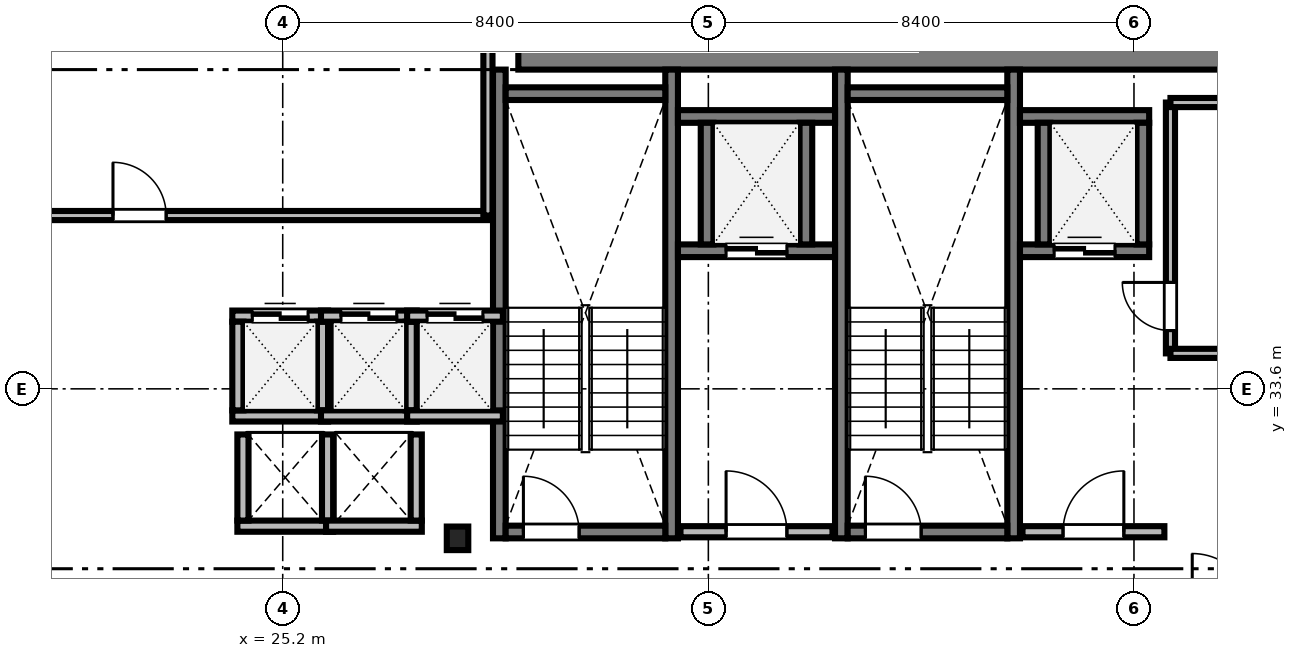
"""IFC4 building model, lengths in metres.
Left out: names, types, materials, properties, quantities, classifications, styles, units other than length and angle.
Written with IfcOpenShell. Run it as: python <this file> out.ifc"""

import sys

from ifc_helpers import new_model, si_unit, direction, frame, frame_2d, origin, origin_2d, place, context, subcontext, project, spatial, rectangle, i_section, extrude, source, transform, mapped, element, fill, save


model = new_model("IFC4")
c1 = context("Model", 3, precision=1e-05, world=origin(), true_north=direction((0.0, 1.0)))
c2 = subcontext(c1, "Body", "Model", "MODEL_VIEW")
j1 = project(units=[si_unit("LENGTHUNIT", "METRE"), si_unit("PLANEANGLEUNIT", "RADIAN")], contexts=[c1])
p1 = place(None, origin())
s1 = spatial("IfcSite", under=j1, at=p1, CompositionType="ELEMENT")
p2 = place(p1, origin())
s2 = spatial("IfcBuilding", under=s1, at=p2, CompositionType="ELEMENT")
p3 = place(p2, frame((0.0, 0.0, 111.3)))
s3 = spatial("IfcBuildingStorey", under=s2, at=p3, CompositionType="ELEMENT", Elevation=111.3)
m1 = source(origin(), c2, "Body", "SweptSolid", [
    extrude(rectangle(XDim=17.52, YDim=0.8, at=frame_2d((8.76, 0.0))), origin(), (0.0, 0.0, 1.0), 3.46),
])
p4 = place(p3, frame((29.85, 40.3, 0.0), z_axis=(0.0, 0.0, 1.0), x_axis=(1.0, 0.0, 0.0)))
e1 = element("IfcWall", 1, at=p4, inside=s3, PredefinedType="SHEAR", context=c2, shape_type="MappedRepresentation", body=[
    mapped(m1, transform((0.0, 0.0, 0.0), scale=1.0)),
])
m2 = source(origin(), c2, "Body", "SweptSolid", [
    extrude(i_section(OverallWidth=0.424, OverallDepth=0.465, WebThickness=0.035, FlangeThickness=0.056, FilletRadius=0.015, at=origin_2d()), origin(), (0.0, 0.0, 1.0), 3.46),
])
p5 = place(p3, frame((28.65, 30.65, 0.0), z_axis=(0.0, 0.0, 1.0), x_axis=(1.0, 0.0, 0.0)))
e2 = element("IfcColumn", 2, at=p5, inside=s3, PredefinedType="COLUMN", context=c2, shape_type="MappedRepresentation", body=[
    mapped(m2, transform((0.0, 0.0, 0.0), scale=1.0)),
])
m3 = source(origin(), c2, "Body", "SweptSolid", [
    extrude(rectangle(XDim=9.25, YDim=0.25, at=frame_2d((4.625, 0.0))), origin(), (0.0, 0.0, 1.0), 3.5),
])
for number, where, z_axis, x_axis in (
    (3, (29.475, 30.65, 0.0), (0.0, 0.0, 1.0), (0.0, 1.0, 0.0)),
    (4, (32.875, 30.65, 0.0), (0.0, 0.0, 1.0), (0.0, 1.0, 0.0)),
):
    element("IfcWall", number, at=place(p3, frame(where, z_axis=z_axis, x_axis=x_axis)), inside=s3, PredefinedType="SOLIDWALL", context=c2, shape_type="MappedRepresentation", body=[
        mapped(m3, transform((0.0, 0.0, 0.0), scale=1.0)),
    ])
m4 = source(origin(), c2, "Body", "SweptSolid", [
    extrude(rectangle(XDim=3.15, YDim=0.25, at=frame_2d((1.575, 0.0))), origin(), (0.0, 0.0, 1.0), 3.5),
])
p6 = place(p3, frame((29.6, 39.425, 0.0), z_axis=(0.0, 0.0, 1.0), x_axis=(1.0, 0.0, 0.0)))
e5 = element("IfcWall", 5, at=p6, inside=s3, PredefinedType="SOLIDWALL", context=c2, shape_type="MappedRepresentation", body=[
    mapped(m4, transform((0.0, 0.0, 0.0), scale=1.0)),
])
p7 = place(p3, frame((29.6, 30.775, 0.0), z_axis=(0.0, 0.0, 1.0), x_axis=(1.0, 0.0, 0.0)))
e6 = element("IfcWall", 6, at=p7, inside=s3, PredefinedType="SOLIDWALL", context=c2, shape_type="MappedRepresentation", body=[
    mapped(m4, transform((0.0, 0.0, 0.0), scale=1.0)),
])
m5 = source(origin(), c2, "Body", "SweptSolid", [
    extrude(rectangle(XDim=1.1, YDim=2.2, at=frame_2d((0.55, 1.1))), frame((0.0, 0.135, 0.0), z_axis=(0.0, -1.0, 0.0), x_axis=(1.0, 0.0, 0.0)), (0.0, 0.0, 1.0), 0.27),
])
p8 = place(p7, frame((0.35, 0.0, 0.0)))
e7 = element("IfcOpeningElement", 7, at=p8, cuts=e6, PredefinedType="OPENING", context=c2, shape_type="MappedRepresentation", body=[
    mapped(m5, transform((0.0, 0.0, 0.0), scale=1.0)),
])
for number, where, z_axis, x_axis in (
    (8, (36.225, 30.65, 0.0), (0.0, 0.0, 1.0), (0.0, 1.0, 0.0)),
    (9, (39.625, 30.65, 0.0), (0.0, 0.0, 1.0), (0.0, 1.0, 0.0)),
):
    element("IfcWall", number, at=place(p3, frame(where, z_axis=z_axis, x_axis=x_axis)), inside=s3, PredefinedType="SOLIDWALL", context=c2, shape_type="MappedRepresentation", body=[
        mapped(m3, transform((0.0, 0.0, 0.0), scale=1.0)),
    ])
p9 = place(p3, frame((36.35, 39.425, 0.0), z_axis=(0.0, 0.0, 1.0), x_axis=(1.0, 0.0, 0.0)))
e10 = element("IfcWall", 10, at=p9, inside=s3, PredefinedType="SOLIDWALL", context=c2, shape_type="MappedRepresentation", body=[
    mapped(m4, transform((0.0, 0.0, 0.0), scale=1.0)),
])
p10 = place(p3, frame((36.35, 30.775, 0.0), z_axis=(0.0, 0.0, 1.0), x_axis=(1.0, 0.0, 0.0)))
e11 = element("IfcWall", 11, at=p10, inside=s3, PredefinedType="SOLIDWALL", context=c2, shape_type="MappedRepresentation", body=[
    mapped(m4, transform((0.0, 0.0, 0.0), scale=1.0)),
])
p11 = place(p10, frame((0.35, 0.0, 0.0)))
e12 = element("IfcOpeningElement", 12, at=p11, cuts=e11, PredefinedType="OPENING", context=c2, shape_type="MappedRepresentation", body=[
    mapped(m5, transform((0.0, 0.0, 0.0), scale=1.0)),
])
m6 = source(origin(), c2, "Body", "SweptSolid", [
    extrude(rectangle(XDim=3.0, YDim=0.22, at=frame_2d((1.5, 0.0))), origin(), (0.0, 0.0, 1.0), 3.46),
])
p12 = place(p3, frame((33.05, 30.78, 0.0), z_axis=(0.0, 0.0, 1.0), x_axis=(1.0, 0.0, 0.0)))
e13 = element("IfcWall", 13, at=p12, inside=s3, PredefinedType="SOLIDWALL", context=c2, shape_type="MappedRepresentation", body=[
    mapped(m6, transform((0.0, 0.0, 0.0), scale=1.0)),
])
m7 = source(origin(), c2, "Body", "SweptSolid", [
    extrude(rectangle(XDim=1.2, YDim=2.2, at=frame_2d((0.6, 1.1))), frame((0.0, 0.12, 0.0), z_axis=(0.0, -1.0, 0.0), x_axis=(1.0, 0.0, 0.0)), (0.0, 0.0, 1.0), 0.24),
])
p13 = place(p12, frame((0.9, 0.0, 0.0)))
e14 = element("IfcOpeningElement", 14, at=p13, cuts=e13, PredefinedType="OPENING", context=c2, shape_type="MappedRepresentation", body=[
    mapped(m7, transform((0.0, 0.0, 0.0), scale=1.0)),
])
m8 = source(origin(), c2, "Body", "SweptSolid", [
    extrude(rectangle(XDim=2.8, YDim=0.22, at=frame_2d((1.4, 0.0))), origin(), (0.0, 0.0, 1.0), 3.46),
])
p14 = place(p3, frame((39.8, 30.78, 0.0), z_axis=(0.0, 0.0, 1.0), x_axis=(1.0, 0.0, 0.0)))
e15 = element("IfcWall", 15, at=p14, inside=s3, PredefinedType="SOLIDWALL", context=c2, shape_type="MappedRepresentation", body=[
    mapped(m8, transform((0.0, 0.0, 0.0), scale=1.0)),
])
p15 = place(p14, frame((0.8, 0.0, 0.0)))
e16 = element("IfcOpeningElement", 16, at=p15, cuts=e15, PredefinedType="OPENING", context=c2, shape_type="MappedRepresentation", body=[
    mapped(m7, transform((0.0, 0.0, 0.0), scale=1.0)),
])
m9 = source(origin(), c2, "Body", "SweptSolid", [
    extrude(rectangle(XDim=1.89, YDim=0.22, at=frame_2d((0.945, 0.0))), origin(), (0.0, 0.0, 1.0), 3.46),
])
p16 = place(p3, frame((24.205, 33.065, 0.0), z_axis=(0.0, 0.0, 1.0), x_axis=(1.0, 0.0, 0.0)))
e17 = element("IfcWall", 17, at=p16, inside=s3, PredefinedType="SOLIDWALL", context=c2, shape_type="MappedRepresentation", body=[
    mapped(m9, transform((0.0, 0.0, 0.0), scale=1.0)),
])
p17 = place(p3, frame((24.205, 35.035, 0.0), z_axis=(0.0, 0.0, 1.0), x_axis=(1.0, 0.0, 0.0)))
e18 = element("IfcWall", 18, at=p17, inside=s3, PredefinedType="SOLIDWALL", context=c2, shape_type="MappedRepresentation", body=[
    mapped(m9, transform((0.0, 0.0, 0.0), scale=1.0)),
])
m10 = source(origin(), c2, "Body", "SweptSolid", [
    extrude(rectangle(XDim=1.1, YDim=2.2, at=frame_2d((0.55, 1.1))), frame((0.0, 0.12, 0.0), z_axis=(0.0, -1.0, 0.0), x_axis=(1.0, 0.0, 0.0)), (0.0, 0.0, 1.0), 0.24),
])
p18 = place(p17, frame((0.395, 0.0, 0.0)))
e19 = element("IfcOpeningElement", 19, at=p18, cuts=e18, PredefinedType="OPENING", context=c2, shape_type="MappedRepresentation", body=[
    mapped(m10, transform((0.0, 0.0, 0.0), scale=1.0)),
])
m11 = source(origin(), c2, "Body", "SweptSolid", [
    extrude(rectangle(XDim=1.75, YDim=0.22, at=frame_2d((0.875, 0.0))), origin(), (0.0, 0.0, 1.0), 3.46),
])
for number, where, z_axis, x_axis in (
    (20, (24.315, 33.175, 0.0), (0.0, 0.0, 1.0), (0.0, 1.0, 0.0)),
    (21, (25.985, 33.175, 0.0), (0.0, 0.0, 1.0), (0.0, 1.0, 0.0)),
):
    element("IfcWall", number, at=place(p3, frame(where, z_axis=z_axis, x_axis=x_axis)), inside=s3, PredefinedType="SOLIDWALL", context=c2, shape_type="MappedRepresentation", body=[
        mapped(m11, transform((0.0, 0.0, 0.0), scale=1.0)),
    ])
p19 = place(p3, frame((25.955, 33.065, 0.0), z_axis=(0.0, 0.0, 1.0), x_axis=(1.0, 0.0, 0.0)))
e22 = element("IfcWall", 22, at=p19, inside=s3, PredefinedType="SOLIDWALL", context=c2, shape_type="MappedRepresentation", body=[
    mapped(m9, transform((0.0, 0.0, 0.0), scale=1.0)),
])
p20 = place(p3, frame((25.955, 35.035, 0.0), z_axis=(0.0, 0.0, 1.0), x_axis=(1.0, 0.0, 0.0)))
e23 = element("IfcWall", 23, at=p20, inside=s3, PredefinedType="SOLIDWALL", context=c2, shape_type="MappedRepresentation", body=[
    mapped(m9, transform((0.0, 0.0, 0.0), scale=1.0)),
])
p21 = place(p20, frame((0.395, 0.0, 0.0)))
e24 = element("IfcOpeningElement", 24, at=p21, cuts=e23, PredefinedType="OPENING", context=c2, shape_type="MappedRepresentation", body=[
    mapped(m10, transform((0.0, 0.0, 0.0), scale=1.0)),
])
p22 = place(p3, frame((27.735, 33.175, 0.0), z_axis=(0.0, 0.0, 1.0), x_axis=(0.0, 1.0, 0.0)))
e25 = element("IfcWall", 25, at=p22, inside=s3, PredefinedType="SOLIDWALL", context=c2, shape_type="MappedRepresentation", body=[
    mapped(m11, transform((0.0, 0.0, 0.0), scale=1.0)),
])
p23 = place(p3, frame((27.655, 33.065, 0.0), z_axis=(0.0, 0.0, 1.0), x_axis=(1.0, 0.0, 0.0)))
e26 = element("IfcWall", 26, at=p23, inside=s3, PredefinedType="SOLIDWALL", context=c2, shape_type="MappedRepresentation", body=[
    mapped(m9, transform((0.0, 0.0, 0.0), scale=1.0)),
])
p24 = place(p3, frame((27.655, 35.035, 0.0), z_axis=(0.0, 0.0, 1.0), x_axis=(1.0, 0.0, 0.0)))
e27 = element("IfcWall", 27, at=p24, inside=s3, PredefinedType="SOLIDWALL", context=c2, shape_type="MappedRepresentation", body=[
    mapped(m9, transform((0.0, 0.0, 0.0), scale=1.0)),
])
p25 = place(p24, frame((0.395, 0.0, 0.0)))
e28 = element("IfcOpeningElement", 28, at=p25, cuts=e27, PredefinedType="OPENING", context=c2, shape_type="MappedRepresentation", body=[
    mapped(m10, transform((0.0, 0.0, 0.0), scale=1.0)),
])
m12 = source(origin(), c2, "Body", "SweptSolid", [
    extrude(rectangle(XDim=3.1, YDim=0.25, at=frame_2d((1.55, 0.0))), origin(), (0.0, 0.0, 1.0), 3.46),
])
p26 = place(p3, frame((33.0, 36.325, 0.0), z_axis=(0.0, 0.0, 1.0), x_axis=(1.0, 0.0, 0.0)))
e29 = element("IfcWall", 29, at=p26, inside=s3, PredefinedType="SOLIDWALL", context=c2, shape_type="MappedRepresentation", body=[
    mapped(m12, transform((0.0, 0.0, 0.0), scale=1.0)),
])
m13 = source(origin(), c2, "Body", "SweptSolid", [
    extrude(rectangle(XDim=1.2, YDim=2.25, at=frame_2d((0.6, 1.125))), frame((0.0, 0.135, 0.0), z_axis=(0.0, -1.0, 0.0), x_axis=(1.0, 0.0, 0.0)), (0.0, 0.0, 1.0), 0.27),
])
p27 = place(p26, frame((0.95, 0.0, 0.0)))
e30 = element("IfcOpeningElement", 30, at=p27, cuts=e29, PredefinedType="OPENING", context=c2, shape_type="MappedRepresentation", body=[
    mapped(m13, transform((0.0, 0.0, 0.0), scale=1.0)),
])
p28 = place(p3, frame((33.0, 38.975, 0.0), z_axis=(0.0, 0.0, 1.0), x_axis=(1.0, 0.0, 0.0)))
e31 = element("IfcWall", 31, at=p28, inside=s3, PredefinedType="SOLIDWALL", context=c2, shape_type="MappedRepresentation", body=[
    mapped(m12, transform((0.0, 0.0, 0.0), scale=1.0)),
])
m14 = source(origin(), c2, "Body", "SweptSolid", [
    extrude(rectangle(XDim=2.4, YDim=0.25, at=frame_2d((1.2, 0.0))), origin(), (0.0, 0.0, 1.0), 3.46),
])
for number, where, z_axis, x_axis in (
    (32, (33.575, 36.45, 0.0), (0.0, 0.0, 1.0), (0.0, 1.0, 0.0)),
    (33, (35.525, 36.45, 0.0), (0.0, 0.0, 1.0), (0.0, 1.0, 0.0)),
):
    element("IfcWall", number, at=place(p3, frame(where, z_axis=z_axis, x_axis=x_axis)), inside=s3, PredefinedType="SOLIDWALL", context=c2, shape_type="MappedRepresentation", body=[
        mapped(m14, transform((0.0, 0.0, 0.0), scale=1.0)),
    ])
m15 = source(origin(), c2, "Body", "SweptSolid", [
    extrude(rectangle(XDim=2.55, YDim=0.25, at=frame_2d((1.275, 0.0))), origin(), (0.0, 0.0, 1.0), 3.46),
])
p29 = place(p3, frame((39.75, 36.325, 0.0), z_axis=(0.0, 0.0, 1.0), x_axis=(1.0, 0.0, 0.0)))
e34 = element("IfcWall", 34, at=p29, inside=s3, PredefinedType="SOLIDWALL", context=c2, shape_type="MappedRepresentation", body=[
    mapped(m15, transform((0.0, 0.0, 0.0), scale=1.0)),
])
p30 = place(p29, frame((0.675, 0.0, 0.0)))
e35 = element("IfcOpeningElement", 35, at=p30, cuts=e34, PredefinedType="OPENING", context=c2, shape_type="MappedRepresentation", body=[
    mapped(m13, transform((0.0, 0.0, 0.0), scale=1.0)),
])
p31 = place(p3, frame((39.75, 38.975, 0.0), z_axis=(0.0, 0.0, 1.0), x_axis=(1.0, 0.0, 0.0)))
e36 = element("IfcWall", 36, at=p31, inside=s3, PredefinedType="SOLIDWALL", context=c2, shape_type="MappedRepresentation", body=[
    mapped(m15, transform((0.0, 0.0, 0.0), scale=1.0)),
])
for number, where, z_axis, x_axis in (
    (37, (40.225, 36.45, 0.0), (0.0, 0.0, 1.0), (0.0, 1.0, 0.0)),
    (38, (42.175, 36.45, 0.0), (0.0, 0.0, 1.0), (0.0, 1.0, 0.0)),
):
    element("IfcWall", number, at=place(p3, frame(where, z_axis=z_axis, x_axis=x_axis)), inside=s3, PredefinedType="SOLIDWALL", context=c2, shape_type="MappedRepresentation", body=[
        mapped(m14, transform((0.0, 0.0, 0.0), scale=1.0)),
    ])
m16 = source(origin(), c2, "Body", "SweptSolid", [
    extrude(rectangle(XDim=1.89, YDim=0.22, at=frame_2d((0.945, 0.0))), origin(), (0.0, 0.0, 1.0), 3.46),
])
p32 = place(p3, frame((24.305, 30.89, 0.0), z_axis=(0.0, 0.0, 1.0), x_axis=(1.0, 0.0, 0.0)))
e39 = element("IfcWall", 39, at=p32, inside=s3, PredefinedType="SOLIDWALL", context=c2, shape_type="MappedRepresentation", body=[
    mapped(m16, transform((0.0, 0.0, 0.0), scale=1.0)),
])
m17 = source(origin(), c2, "Body", "SweptSolid", [
    extrude(rectangle(XDim=1.7, YDim=0.22, at=frame_2d((0.85, 0.0))), origin(), (0.0, 0.0, 1.0), 3.46),
])
for number, where, z_axis, x_axis in (
    (40, (24.415, 31.0, 0.0), (0.0, 0.0, 1.0), (0.0, 1.0, 0.0)),
    (41, (26.085, 31.0, 0.0), (0.0, 0.0, 1.0), (0.0, 1.0, 0.0)),
):
    element("IfcWall", number, at=place(p3, frame(where, z_axis=z_axis, x_axis=x_axis)), inside=s3, PredefinedType="SOLIDWALL", context=c2, shape_type="MappedRepresentation", body=[
        mapped(m17, transform((0.0, 0.0, 0.0), scale=1.0)),
    ])
p33 = place(p3, frame((26.055, 30.89, 0.0), z_axis=(0.0, 0.0, 1.0), x_axis=(1.0, 0.0, 0.0)))
e42 = element("IfcWall", 42, at=p33, inside=s3, PredefinedType="SOLIDWALL", context=c2, shape_type="MappedRepresentation", body=[
    mapped(m16, transform((0.0, 0.0, 0.0), scale=1.0)),
])
p34 = place(p3, frame((27.835, 31.0, 0.0), z_axis=(0.0, 0.0, 1.0), x_axis=(0.0, 1.0, 0.0)))
e43 = element("IfcWall", 43, at=p34, inside=s3, PredefinedType="SOLIDWALL", context=c2, shape_type="MappedRepresentation", body=[
    mapped(m17, transform((0.0, 0.0, 0.0), scale=1.0)),
])
m18 = source(origin(), c2, "Body", "SweptSolid", [
    extrude(rectangle(XDim=22.328, YDim=0.18, at=frame_2d((11.164, 0.0))), origin(), (0.0, 0.0, 1.0), 2.702),
])
p35 = place(p3, frame((6.922, 37.02, 0.0), z_axis=(0.0, 0.0, 1.0), x_axis=(1.0, 0.0, 0.0)))
e44 = element("IfcWall", 44, at=p35, inside=s3, PredefinedType="PARTITIONING", context=c2, shape_type="MappedRepresentation", body=[
    mapped(m18, transform((0.0, 0.0, 0.0), scale=1.0)),
])
m19 = source(origin(), c2, "Body", "SweptSolid", [
    extrude(rectangle(XDim=1.05, YDim=2.2, at=frame_2d((0.525, 1.1))), frame((0.0, 0.1, 0.0), z_axis=(0.0, -1.0, 0.0), x_axis=(1.0, 0.0, 0.0)), (0.0, 0.0, 1.0), 0.2),
])
p36 = place(p35, frame((14.928, 0.0, 0.0)))
e45 = element("IfcOpeningElement", 45, at=p36, cuts=e44, PredefinedType="OPENING", context=c2, shape_type="MappedRepresentation", body=[
    mapped(m19, transform((0.0, 0.0, 0.0), scale=1.0)),
])
m20 = source(origin(), c2, "Body", "SweptSolid", [
    extrude(rectangle(XDim=4.95, YDim=0.18, at=frame_2d((2.475, 0.0))), origin(), (0.0, 0.0, 1.0), 3.46),
])
p37 = place(p3, frame((42.72, 34.3, 0.0), z_axis=(0.0, 0.0, 1.0), x_axis=(0.0, 1.0, 0.0)))
e46 = element("IfcWall", 46, at=p37, inside=s3, PredefinedType="PARTITIONING", context=c2, shape_type="MappedRepresentation", body=[
    mapped(m20, transform((0.0, 0.0, 0.0), scale=1.0)),
])
m21 = source(origin(), c2, "Body", "SweptSolid", [
    extrude(rectangle(XDim=0.95, YDim=2.15, at=frame_2d((0.475, 1.075))), frame((0.0, 0.1, 0.0), z_axis=(0.0, -1.0, 0.0), x_axis=(1.0, 0.0, 0.0)), (0.0, 0.0, 1.0), 0.2),
])
p38 = place(p37, frame((0.45, 0.0, 0.0)))
e47 = element("IfcOpeningElement", 47, at=p38, cuts=e46, PredefinedType="OPENING", context=c2, shape_type="MappedRepresentation", body=[
    mapped(m21, transform((0.0, 0.0, 0.0), scale=1.0)),
])
m22 = source(origin(), c2, "Body", "SweptSolid", [
    extrude(rectangle(XDim=11.45, YDim=0.18, at=frame_2d((5.725, 0.0))), origin(), (0.0, 0.0, 1.0), 2.702),
])
p39 = place(p3, frame((29.25, 37.02, 0.0), z_axis=(0.0, 0.0, 1.0), x_axis=(0.0, 1.0, 0.0)))
e48 = element("IfcWall", 48, at=p39, inside=s3, PredefinedType="PARTITIONING", context=c2, shape_type="MappedRepresentation", body=[
    mapped(m22, transform((0.0, 0.0, 0.0), scale=1.0)),
])
m23 = source(origin(), c2, "Body", "SweptSolid", [
    extrude(rectangle(XDim=1.128, YDim=0.18, at=frame_2d((0.564, 0.0))), origin(), (0.0, 0.0, 1.0), 3.46),
])
for number, where, z_axis, x_axis in (
    (49, (42.72, 34.3, 0.0), (0.0, 0.0, 1.0), (1.0, 0.0, 0.0)),
    (50, (42.72, 39.25, 0.0), (0.0, 0.0, 1.0), (1.0, 0.0, 0.0)),
):
    element("IfcWall", number, at=place(p3, frame(where, z_axis=z_axis, x_axis=x_axis)), inside=s3, PredefinedType="PARTITIONING", context=c2, shape_type="MappedRepresentation", body=[
        mapped(m23, transform((0.0, 0.0, 0.0), scale=1.0)),
    ])
m24 = source(origin(), c2, "Body", "SweptSolid", [
    extrude(rectangle(XDim=1.1, YDim=2.2, at=frame_2d((0.55, 1.1))), frame((0.0, 0.025, 0.0), z_axis=(0.0, -1.0, 0.0), x_axis=(1.0, 0.0, 0.0)), (0.0, 0.0, 1.0), 0.05),
])
p40 = place(p8, origin())
e51 = element("IfcDoor", 51, at=p40, inside=s3, OperationType="SINGLE_SWING_LEFT", PredefinedType="DOOR", context=c2, shape_type="MappedRepresentation", body=[
    mapped(m24, transform((0.0, 0.0, 0.0), scale=1.0)),
])
fill(e7, e51)
p41 = place(p11, origin())
e52 = element("IfcDoor", 52, at=p41, inside=s3, OperationType="SINGLE_SWING_LEFT", PredefinedType="DOOR", context=c2, shape_type="MappedRepresentation", body=[
    mapped(m24, transform((0.0, 0.0, 0.0), scale=1.0)),
])
fill(e12, e52)
m25 = source(origin(), c2, "Body", "SweptSolid", [
    extrude(rectangle(XDim=1.2, YDim=2.2, at=frame_2d((0.6, 1.1))), frame((0.0, 0.025, 0.0), z_axis=(0.0, -1.0, 0.0), x_axis=(1.0, 0.0, 0.0)), (0.0, 0.0, 1.0), 0.05),
])
p42 = place(p13, origin())
e53 = element("IfcDoor", 53, at=p42, inside=s3, OperationType="SINGLE_SWING_LEFT", PredefinedType="DOOR", context=c2, shape_type="MappedRepresentation", body=[
    mapped(m25, transform((0.0, 0.0, 0.0), scale=1.0)),
])
fill(e14, e53)
p43 = place(p15, origin())
e54 = element("IfcDoor", 54, at=p43, inside=s3, OperationType="SINGLE_SWING_RIGHT", PredefinedType="DOOR", context=c2, shape_type="MappedRepresentation", body=[
    mapped(m25, transform((0.0, 0.0, 0.0), scale=1.0)),
])
fill(e16, e54)
p44 = place(p18, origin())
e55 = element("IfcDoor", 55, at=p44, inside=s3, OperationType="DOUBLE_DOOR_SLIDING", PredefinedType="DOOR", context=c2, shape_type="MappedRepresentation", body=[
    mapped(m24, transform((0.0, 0.0, 0.0), scale=1.0)),
])
fill(e19, e55)
p45 = place(p21, origin())
e56 = element("IfcDoor", 56, at=p45, inside=s3, OperationType="DOUBLE_DOOR_SLIDING", PredefinedType="DOOR", context=c2, shape_type="MappedRepresentation", body=[
    mapped(m24, transform((0.0, 0.0, 0.0), scale=1.0)),
])
fill(e24, e56)
p46 = place(p25, origin())
e57 = element("IfcDoor", 57, at=p46, inside=s3, OperationType="DOUBLE_DOOR_SLIDING", PredefinedType="DOOR", context=c2, shape_type="MappedRepresentation", body=[
    mapped(m24, transform((0.0, 0.0, 0.0), scale=1.0)),
])
fill(e28, e57)
m26 = source(origin(), c2, "Body", "SweptSolid", [
    extrude(rectangle(XDim=1.2, YDim=2.25, at=frame_2d((0.6, 1.125))), frame((0.0, 0.025, 0.0), z_axis=(0.0, -1.0, 0.0), x_axis=(1.0, 0.0, 0.0)), (0.0, 0.0, 1.0), 0.05),
])
p47 = place(p27, origin())
e58 = element("IfcDoor", 58, at=p47, inside=s3, OperationType="DOUBLE_DOOR_SLIDING", PredefinedType="DOOR", context=c2, shape_type="MappedRepresentation", body=[
    mapped(m26, transform((0.0, 0.0, 0.0), scale=1.0)),
])
fill(e30, e58)
p48 = place(p30, origin())
e59 = element("IfcDoor", 59, at=p48, inside=s3, OperationType="DOUBLE_DOOR_SLIDING", PredefinedType="DOOR", context=c2, shape_type="MappedRepresentation", body=[
    mapped(m26, transform((0.0, 0.0, 0.0), scale=1.0)),
])
fill(e35, e59)
m27 = source(origin(), c2, "Body", "SweptSolid", [
    extrude(rectangle(XDim=1.05, YDim=2.2, at=frame_2d((0.525, 1.1))), frame((0.0, 0.025, 0.0), z_axis=(0.0, -1.0, 0.0), x_axis=(1.0, 0.0, 0.0)), (0.0, 0.0, 1.0), 0.05),
])
p49 = place(p36, origin())
e60 = element("IfcDoor", 60, at=p49, inside=s3, OperationType="SINGLE_SWING_LEFT", PredefinedType="DOOR", context=c2, shape_type="MappedRepresentation", body=[
    mapped(m27, transform((0.0, 0.0, 0.0), scale=1.0)),
])
fill(e45, e60)
m28 = source(origin(), c2, "Body", "SweptSolid", [
    extrude(rectangle(XDim=0.95, YDim=2.15, at=frame_2d((0.475, 1.075))), frame((0.0, 0.025, 0.0), z_axis=(0.0, -1.0, 0.0), x_axis=(1.0, 0.0, 0.0)), (0.0, 0.0, 1.0), 0.05),
])
p50 = place(p38, origin())
e61 = element("IfcDoor", 61, at=p50, inside=s3, OperationType="SINGLE_SWING_RIGHT", PredefinedType="DOOR", context=c2, shape_type="MappedRepresentation", body=[
    mapped(m28, transform((0.0, 0.0, 0.0), scale=1.0)),
])
fill(e47, e61)
save(model, sys.argv[1])
